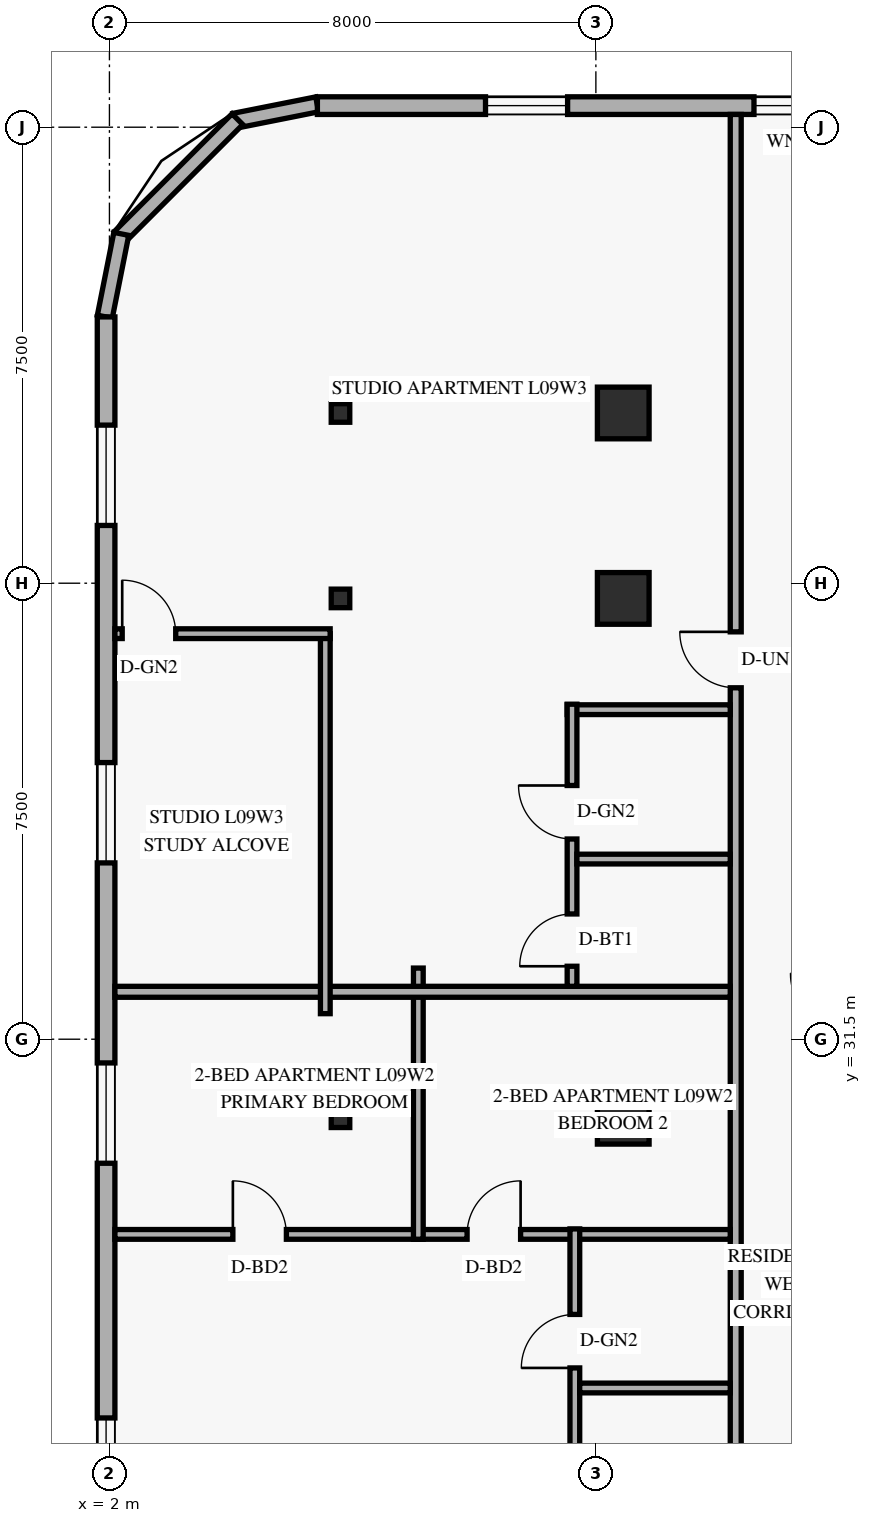
"""IFC4 building model, lengths in metres.
Left out: names, types, materials, properties, quantities, classifications, styles, units other than length and angle.
Written with IfcOpenShell. Run it as: python <this file> out.ifc"""

import sys

from ifc_helpers import new_model, si_unit, direction, frame, frame_2d, origin, origin_2d, place, context, subcontext, project, spatial, rectangle, hollow_rectangle, extrude, element, fill, save


model = new_model("IFC4")
c1 = context("Model", 3, precision=1e-05, world=origin(), true_north=direction((0.0, 1.0)))
c2 = subcontext(c1, "Body", "Model", "MODEL_VIEW")
j1 = project(units=[si_unit("LENGTHUNIT", "METRE"), si_unit("PLANEANGLEUNIT", "RADIAN")], contexts=[c1])
p1 = place(None, origin())
s1 = spatial("IfcSite", under=j1, at=p1, CompositionType="ELEMENT")
p2 = place(p1, origin())
s2 = spatial("IfcBuilding", under=s1, at=p2, CompositionType="ELEMENT")
p3 = place(p2, frame((0.0, 0.0, 38.4)))
s3 = spatial("IfcBuildingStorey", under=s2, at=p3, CompositionType="ELEMENT", Elevation=38.4)
for number, where, z_axis, x_axis in (
    (1, (5.8, 30.2, 0.0), (0.0, 0.0, 1.0), (1.0, 0.0, 0.0)),
    (2, (5.8, 38.75, 0.0), (0.0, 0.0, 1.0), (1.0, 0.0, 0.0)),
    (3, (5.8, 41.8, 0.0), (0.0, 0.0, 1.0), (1.0, 0.0, 0.0)),
):
    element("IfcColumn", number, at=place(p3, frame(where, z_axis=z_axis, x_axis=x_axis)), inside=s3, PredefinedType="COLUMN", context=c2, shape_type="SweptSolid", body=[
        extrude(hollow_rectangle(XDim=0.305, YDim=0.305, WallThickness=0.013, at=origin_2d()), origin(), (0.0, 0.0, 1.0), 3.6),
    ])
for number, where, z_axis, x_axis in (
    (4, (10.45, 30.2, 0.0), (0.0, 0.0, 1.0), (1.0, 0.0, 0.0)),
    (5, (10.45, 38.75, 0.0), (0.0, 0.0, 1.0), (1.0, 0.0, 0.0)),
    (6, (10.45, 41.8, 0.0), (0.0, 0.0, 1.0), (1.0, 0.0, 0.0)),
):
    element("IfcColumn", number, at=place(p3, frame(where, z_axis=z_axis, x_axis=x_axis)), inside=s3, PredefinedType="COLUMN", context=c2, shape_type="SweptSolid", body=[
        extrude(rectangle(XDim=0.85, YDim=0.85, at=origin_2d()), origin(), (0.0, 0.0, 1.0), 3.6),
    ])
p4 = place(p3, frame((5.417, 46.876, 0.0), z_axis=(0.0, 0.0, 1.0), x_axis=(-0.980809899341, -0.19496651342, 0.0)))
e7 = element("IfcWall", 7, at=p4, inside=s3, PredefinedType="SOLIDWALL", context=c2, shape_type="SweptSolid", body=[
    extrude(rectangle(XDim=1.389, YDim=0.25, at=frame_2d((0.694, 0.0))), origin(), (0.0, 0.0, 1.0), 3.36),
])
p5 = place(p3, frame((4.105, 46.632, 0.0), z_axis=(0.0, 0.0, 1.0), x_axis=(-0.707106781187, -0.707106781187, 0.0)))
e8 = element("IfcWall", 8, at=p5, inside=s3, PredefinedType="SOLIDWALL", context=c2, shape_type="SweptSolid", body=[
    extrude(rectangle(XDim=2.739, YDim=0.25, at=frame_2d((1.37, 0.0))), origin(), (0.0, 0.0, 1.0), 3.36),
])
p6 = place(p3, frame((2.195, 44.746, 0.0), z_axis=(0.0, 0.0, 1.0), x_axis=(-0.19496651342, -0.980809899341, 0.0)))
e9 = element("IfcWall", 9, at=p6, inside=s3, PredefinedType="SOLIDWALL", context=c2, shape_type="SweptSolid", body=[
    extrude(rectangle(XDim=1.389, YDim=0.25, at=frame_2d((0.694, 0.0))), origin(), (0.0, 0.0, 1.0), 3.36),
])
p7 = place(p3, frame((44.98, 46.855, 0.0), z_axis=(0.0, 0.0, 1.0), x_axis=(-1.0, 0.0, 0.0)))
e10 = element("IfcWall", 10, at=p7, inside=s3, PredefinedType="SOLIDWALL", context=c2, shape_type="SweptSolid", body=[
    extrude(rectangle(XDim=39.56, YDim=0.29, at=frame_2d((19.78, 0.0))), origin(), (0.0, 0.0, 1.0), 3.36),
])
p8 = place(p7, frame((35.445, 0.0, 0.85)))
e11 = element("IfcOpeningElement", 11, at=p8, cuts=e10, PredefinedType="OPENING", context=c2, shape_type="SweptSolid", body=[
    extrude(rectangle(XDim=1.35, YDim=1.55, at=frame_2d((0.675, 0.775))), frame((0.0, 0.155, 0.0), z_axis=(0.0, -1.0, 0.0), x_axis=(1.0, 0.0, 0.0)), (0.0, 0.0, 1.0), 0.31),
])
p9 = place(p7, frame((31.18, 0.0, 0.85)))
e12 = element("IfcOpeningElement", 12, at=p9, cuts=e10, PredefinedType="OPENING", context=c2, shape_type="SweptSolid", body=[
    extrude(rectangle(XDim=1.2, YDim=1.5, at=frame_2d((0.6, 0.75))), frame((0.0, 0.155, 0.0), z_axis=(0.0, -1.0, 0.0), x_axis=(1.0, 0.0, 0.0)), (0.0, 0.0, 1.0), 0.31),
])
p10 = place(p7, frame((25.834, 0.0, 0.85)))
e13 = element("IfcOpeningElement", 13, at=p10, cuts=e10, PredefinedType="OPENING", context=c2, shape_type="SweptSolid", body=[
    extrude(rectangle(XDim=1.35, YDim=1.55, at=frame_2d((0.675, 0.775))), frame((0.0, 0.155, 0.0), z_axis=(0.0, -1.0, 0.0), x_axis=(1.0, 0.0, 0.0)), (0.0, 0.0, 1.0), 0.31),
])
p11 = place(p7, frame((18.799, 0.0, 0.85)))
e14 = element("IfcOpeningElement", 14, at=p11, cuts=e10, PredefinedType="OPENING", context=c2, shape_type="SweptSolid", body=[
    extrude(rectangle(XDim=1.35, YDim=1.55, at=frame_2d((0.675, 0.775))), frame((0.0, 0.155, 0.0), z_axis=(0.0, -1.0, 0.0), x_axis=(1.0, 0.0, 0.0)), (0.0, 0.0, 1.0), 0.31),
])
p12 = place(p7, frame((12.51, 0.0, 0.85)))
e15 = element("IfcOpeningElement", 15, at=p12, cuts=e10, PredefinedType="OPENING", context=c2, shape_type="SweptSolid", body=[
    extrude(rectangle(XDim=1.35, YDim=1.55, at=frame_2d((0.675, 0.775))), frame((0.0, 0.155, 0.0), z_axis=(0.0, -1.0, 0.0), x_axis=(1.0, 0.0, 0.0)), (0.0, 0.0, 1.0), 0.31),
])
p13 = place(p7, frame((7.82, 0.0, 0.85)))
e16 = element("IfcOpeningElement", 16, at=p13, cuts=e10, PredefinedType="OPENING", context=c2, shape_type="SweptSolid", body=[
    extrude(rectangle(XDim=1.35, YDim=1.55, at=frame_2d((0.675, 0.775))), frame((0.0, 0.155, 0.0), z_axis=(0.0, -1.0, 0.0), x_axis=(1.0, 0.0, 0.0)), (0.0, 0.0, 1.0), 0.31),
])
p14 = place(p7, frame((5.333, 0.0, 0.85)))
e17 = element("IfcOpeningElement", 17, at=p14, cuts=e10, PredefinedType="OPENING", context=c2, shape_type="SweptSolid", body=[
    extrude(rectangle(XDim=1.35, YDim=1.55, at=frame_2d((0.675, 0.775))), frame((0.0, 0.155, 0.0), z_axis=(0.0, -1.0, 0.0), x_axis=(1.0, 0.0, 0.0)), (0.0, 0.0, 1.0), 0.31),
])
p15 = place(p7, frame((1.618, 0.0, 0.85)))
e18 = element("IfcOpeningElement", 18, at=p15, cuts=e10, PredefinedType="OPENING", context=c2, shape_type="SweptSolid", body=[
    extrude(rectangle(XDim=1.35, YDim=1.55, at=frame_2d((0.675, 0.775))), frame((0.0, 0.155, 0.0), z_axis=(0.0, -1.0, 0.0), x_axis=(1.0, 0.0, 0.0)), (0.0, 0.0, 1.0), 0.31),
])
p16 = place(p3, frame((1.945, 43.38, 0.0), z_axis=(0.0, 0.0, 1.0), x_axis=(0.0, -1.0, 0.0)))
e19 = element("IfcWall", 19, at=p16, inside=s3, PredefinedType="SOLIDWALL", context=c2, shape_type="SweptSolid", body=[
    extrude(rectangle(XDim=38.76, YDim=0.29, at=frame_2d((19.38, 0.0))), origin(), (0.0, 0.0, 1.0), 3.36),
])
p17 = place(p16, frame((33.975, 0.0, 0.85)))
e20 = element("IfcOpeningElement", 20, at=p17, cuts=e19, PredefinedType="OPENING", context=c2, shape_type="SweptSolid", body=[
    extrude(rectangle(XDim=1.65, YDim=1.6, at=frame_2d((0.825, 0.8))), frame((0.0, 0.155, 0.0), z_axis=(0.0, -1.0, 0.0), x_axis=(1.0, 0.0, 0.0)), (0.0, 0.0, 1.0), 0.31),
])
p18 = place(p16, frame((27.965, 0.0, 0.85)))
e21 = element("IfcOpeningElement", 21, at=p18, cuts=e19, PredefinedType="OPENING", context=c2, shape_type="SweptSolid", body=[
    extrude(rectangle(XDim=1.65, YDim=1.6, at=frame_2d((0.825, 0.8))), frame((0.0, 0.155, 0.0), z_axis=(0.0, -1.0, 0.0), x_axis=(1.0, 0.0, 0.0)), (0.0, 0.0, 1.0), 0.31),
])
p19 = place(p16, frame((23.934, 0.0, 0.85)))
e22 = element("IfcOpeningElement", 22, at=p19, cuts=e19, PredefinedType="OPENING", context=c2, shape_type="SweptSolid", body=[
    extrude(rectangle(XDim=1.65, YDim=1.6, at=frame_2d((0.825, 0.8))), frame((0.0, 0.155, 0.0), z_axis=(0.0, -1.0, 0.0), x_axis=(1.0, 0.0, 0.0)), (0.0, 0.0, 1.0), 0.31),
])
p20 = place(p16, frame((18.109, 0.0, 0.85)))
e23 = element("IfcOpeningElement", 23, at=p20, cuts=e19, PredefinedType="OPENING", context=c2, shape_type="SweptSolid", body=[
    extrude(rectangle(XDim=1.65, YDim=1.6, at=frame_2d((0.825, 0.8))), frame((0.0, 0.155, 0.0), z_axis=(0.0, -1.0, 0.0), x_axis=(1.0, 0.0, 0.0)), (0.0, 0.0, 1.0), 0.31),
])
p21 = place(p16, frame((12.27, 0.0, 0.85)))
e24 = element("IfcOpeningElement", 24, at=p21, cuts=e19, PredefinedType="OPENING", context=c2, shape_type="SweptSolid", body=[
    extrude(rectangle(XDim=1.65, YDim=1.6, at=frame_2d((0.825, 0.8))), frame((0.0, 0.155, 0.0), z_axis=(0.0, -1.0, 0.0), x_axis=(1.0, 0.0, 0.0)), (0.0, 0.0, 1.0), 0.31),
])
p22 = place(p16, frame((7.33, 0.0, 0.85)))
e25 = element("IfcOpeningElement", 25, at=p22, cuts=e19, PredefinedType="OPENING", context=c2, shape_type="SweptSolid", body=[
    extrude(rectangle(XDim=1.65, YDim=1.6, at=frame_2d((0.825, 0.8))), frame((0.0, 0.155, 0.0), z_axis=(0.0, -1.0, 0.0), x_axis=(1.0, 0.0, 0.0)), (0.0, 0.0, 1.0), 0.31),
])
p23 = place(p16, frame((1.78, 0.0, 0.85)))
e26 = element("IfcOpeningElement", 26, at=p23, cuts=e19, PredefinedType="OPENING", context=c2, shape_type="SweptSolid", body=[
    extrude(rectangle(XDim=1.65, YDim=1.6, at=frame_2d((0.825, 0.8))), frame((0.0, 0.155, 0.0), z_axis=(0.0, -1.0, 0.0), x_axis=(1.0, 0.0, 0.0)), (0.0, 0.0, 1.0), 0.31),
])
p24 = place(p3, frame((12.3, 1.29, 0.0), z_axis=(0.0, 0.0, 1.0), x_axis=(0.0, 1.0, 0.0)))
e27 = element("IfcWall", 27, at=p24, inside=s3, PredefinedType="STANDARD", context=c2, shape_type="SweptSolid", body=[
    extrude(rectangle(XDim=45.42, YDim=0.18, at=frame_2d((22.71, 0.0))), origin(), (0.0, 0.0, 1.0), 2.649),
])
p25 = place(p24, frame((8.06, 0.0, 0.0)))
e28 = element("IfcOpeningElement", 28, at=p25, cuts=e27, PredefinedType="OPENING", context=c2, shape_type="SweptSolid", body=[
    extrude(rectangle(XDim=0.92, YDim=2.15, at=frame_2d((0.46, 1.075))), frame((0.0, 0.1, 0.0), z_axis=(0.0, -1.0, 0.0), x_axis=(1.0, 0.0, 0.0)), (0.0, 0.0, 1.0), 0.2),
])
p26 = place(p24, frame((21.021, 0.0, 0.0)))
e29 = element("IfcOpeningElement", 29, at=p26, cuts=e27, PredefinedType="OPENING", context=c2, shape_type="SweptSolid", body=[
    extrude(rectangle(XDim=0.92, YDim=2.15, at=frame_2d((0.46, 1.075))), frame((0.0, 0.1, 0.0), z_axis=(0.0, -1.0, 0.0), x_axis=(1.0, 0.0, 0.0)), (0.0, 0.0, 1.0), 0.2),
])
p27 = place(p24, frame((35.99, 0.0, 0.0)))
e30 = element("IfcOpeningElement", 30, at=p27, cuts=e27, PredefinedType="OPENING", context=c2, shape_type="SweptSolid", body=[
    extrude(rectangle(XDim=0.92, YDim=2.15, at=frame_2d((0.46, 1.075))), frame((0.0, 0.1, 0.0), z_axis=(0.0, -1.0, 0.0), x_axis=(1.0, 0.0, 0.0)), (0.0, 0.0, 1.0), 0.2),
])
p28 = place(p3, frame((2.09, 28.29, 0.0), z_axis=(0.0, 0.0, 1.0), x_axis=(1.0, 0.0, 0.0)))
e31 = element("IfcWall", 31, at=p28, inside=s3, PredefinedType="PARTITIONING", context=c2, shape_type="SweptSolid", body=[
    extrude(rectangle(XDim=10.12, YDim=0.16, at=frame_2d((5.06, 0.0))), origin(), (0.0, 0.0, 1.0), 2.649),
])
p29 = place(p28, frame((1.94, 0.0, 0.0)))
e32 = element("IfcOpeningElement", 32, at=p29, cuts=e31, PredefinedType="OPENING", context=c2, shape_type="SweptSolid", body=[
    extrude(rectangle(XDim=0.88, YDim=2.14, at=frame_2d((0.44, 1.07))), frame((0.0, 0.09, 0.0), z_axis=(0.0, -1.0, 0.0), x_axis=(1.0, 0.0, 0.0)), (0.0, 0.0, 1.0), 0.18),
])
p30 = place(p28, frame((5.792, 0.0, 0.0)))
e33 = element("IfcOpeningElement", 33, at=p30, cuts=e31, PredefinedType="OPENING", context=c2, shape_type="SweptSolid", body=[
    extrude(rectangle(XDim=0.88, YDim=2.14, at=frame_2d((0.44, 1.07))), frame((0.0, 0.09, 0.0), z_axis=(0.0, -1.0, 0.0), x_axis=(1.0, 0.0, 0.0)), (0.0, 0.0, 1.0), 0.18),
])
p31 = place(p3, frame((9.654, 23.521, 0.0), z_axis=(0.0, 0.0, 1.0), x_axis=(0.0, 1.0, 0.0)))
e34 = element("IfcWall", 34, at=p31, inside=s3, PredefinedType="PLUMBINGWALL", context=c2, shape_type="SweptSolid", body=[
    extrude(rectangle(XDim=4.858, YDim=0.16, at=frame_2d((2.429, 0.0))), origin(), (0.0, 0.0, 1.0), 3.36),
])
p32 = place(p31, frame((0.42, 0.0, 0.0)))
e35 = element("IfcOpeningElement", 35, at=p32, cuts=e34, PredefinedType="OPENING", context=c2, shape_type="SweptSolid", body=[
    extrude(rectangle(XDim=0.86, YDim=2.12, at=frame_2d((0.43, 1.06))), frame((0.0, 0.09, 0.0), z_axis=(0.0, -1.0, 0.0), x_axis=(1.0, 0.0, 0.0)), (0.0, 0.0, 1.0), 0.18),
])
p33 = place(p31, frame((2.572, 0.0, 0.0)))
e36 = element("IfcOpeningElement", 36, at=p33, cuts=e34, PredefinedType="OPENING", context=c2, shape_type="SweptSolid", body=[
    extrude(rectangle(XDim=0.88, YDim=2.12, at=frame_2d((0.44, 1.06))), frame((0.0, 0.09, 0.0), z_axis=(0.0, -1.0, 0.0), x_axis=(1.0, 0.0, 0.0)), (0.0, 0.0, 1.0), 0.18),
])
p34 = place(p3, frame((9.734, 25.764, 0.0), z_axis=(0.0, 0.0, 1.0), x_axis=(1.0, 0.0, 0.0)))
e37 = element("IfcWall", 37, at=p34, inside=s3, PredefinedType="PLUMBINGWALL", context=c2, shape_type="SweptSolid", body=[
    extrude(rectangle(XDim=2.476, YDim=0.16, at=frame_2d((1.238, 0.0))), origin(), (0.0, 0.0, 1.0), 2.649),
])
p35 = place(p3, frame((7.08, 28.21, 0.0), z_axis=(0.0, 0.0, 1.0), x_axis=(0.0, 1.0, 0.0)))
e38 = element("IfcWall", 38, at=p35, inside=s3, PredefinedType="PARTITIONING", context=c2, shape_type="SweptSolid", body=[
    extrude(rectangle(XDim=4.46, YDim=0.16, at=frame_2d((2.23, 0.0))), origin(), (0.0, 0.0, 1.0), 2.649),
])
p36 = place(p3, frame((2.09, 32.28, 0.0), z_axis=(0.0, 0.0, 1.0), x_axis=(1.0, 0.0, 0.0)))
e39 = element("IfcWall", 39, at=p36, inside=s3, PredefinedType="PARTITIONING", context=c2, shape_type="SweptSolid", body=[
    extrude(rectangle(XDim=10.12, YDim=0.18, at=frame_2d((5.06, 0.0))), origin(), (0.0, 0.0, 1.0), 2.649),
])
p37 = place(p3, frame((9.528, 36.92, 0.0), z_axis=(0.0, 0.0, 1.0), x_axis=(1.0, 0.0, 0.0)))
e40 = element("IfcWall", 40, at=p37, inside=s3, PredefinedType="PLUMBINGWALL", context=c2, shape_type="SweptSolid", body=[
    extrude(rectangle(XDim=2.682, YDim=0.16, at=frame_2d((1.341, 0.0))), origin(), (0.0, 0.0, 1.0), 2.649),
])
p38 = place(p3, frame((9.608, 32.37, 0.0), z_axis=(0.0, 0.0, 1.0), x_axis=(0.0, 1.0, 0.0)))
e41 = element("IfcWall", 41, at=p38, inside=s3, PredefinedType="PLUMBINGWALL", context=c2, shape_type="SweptSolid", body=[
    extrude(rectangle(XDim=4.64, YDim=0.16, at=frame_2d((2.32, 0.0))), origin(), (0.0, 0.0, 1.0), 2.932),
])
p39 = place(p38, frame((0.33, 0.0, 0.0)))
e42 = element("IfcOpeningElement", 42, at=p39, cuts=e41, PredefinedType="OPENING", context=c2, shape_type="SweptSolid", body=[
    extrude(rectangle(XDim=0.86, YDim=2.12, at=frame_2d((0.43, 1.06))), frame((0.0, 0.09, 0.0), z_axis=(0.0, -1.0, 0.0), x_axis=(1.0, 0.0, 0.0)), (0.0, 0.0, 1.0), 0.18),
])
p40 = place(p38, frame((2.423, 0.0, 0.0)))
e43 = element("IfcOpeningElement", 43, at=p40, cuts=e41, PredefinedType="OPENING", context=c2, shape_type="SweptSolid", body=[
    extrude(rectangle(XDim=0.88, YDim=2.12, at=frame_2d((0.44, 1.06))), frame((0.0, 0.09, 0.0), z_axis=(0.0, -1.0, 0.0), x_axis=(1.0, 0.0, 0.0)), (0.0, 0.0, 1.0), 0.18),
])
p41 = place(p3, frame((9.688, 34.463, 0.0), z_axis=(0.0, 0.0, 1.0), x_axis=(1.0, 0.0, 0.0)))
e44 = element("IfcWall", 44, at=p41, inside=s3, PredefinedType="PLUMBINGWALL", context=c2, shape_type="SweptSolid", body=[
    extrude(rectangle(XDim=2.522, YDim=0.16, at=frame_2d((1.261, 0.0))), origin(), (0.0, 0.0, 1.0), 2.649),
])
p42 = place(p3, frame((5.55, 31.92, 0.0), z_axis=(0.0, 0.0, 1.0), x_axis=(0.0, 1.0, 0.0)))
e45 = element("IfcWall", 45, at=p42, inside=s3, PredefinedType="PARTITIONING", context=c2, shape_type="SweptSolid", body=[
    extrude(rectangle(XDim=6.25, YDim=0.16, at=frame_2d((3.125, 0.0))), origin(), (0.0, 0.0, 1.0), 3.36),
])
p43 = place(p3, frame((2.09, 38.17, 0.0), z_axis=(0.0, 0.0, 1.0), x_axis=(1.0, 0.0, 0.0)))
e46 = element("IfcWall", 46, at=p43, inside=s3, PredefinedType="PARTITIONING", context=c2, shape_type="SweptSolid", body=[
    extrude(rectangle(XDim=3.54, YDim=0.16, at=frame_2d((1.77, 0.0))), origin(), (0.0, 0.0, 1.0), 3.36),
])
p44 = place(p43, frame((0.12, 0.0, 0.0)))
e47 = element("IfcOpeningElement", 47, at=p44, cuts=e46, PredefinedType="OPENING", context=c2, shape_type="SweptSolid", body=[
    extrude(rectangle(XDim=0.88, YDim=2.12, at=frame_2d((0.44, 1.06))), frame((0.0, 0.09, 0.0), z_axis=(0.0, -1.0, 0.0), x_axis=(1.0, 0.0, 0.0)), (0.0, 0.0, 1.0), 0.18),
])
p45 = place(p8, origin())
e48 = element("IfcWindow", 48, at=p45, inside=s3, PartitioningType="SINGLE_PANEL", PredefinedType="WINDOW", context=c2, shape_type="SweptSolid", body=[
    extrude(rectangle(XDim=1.35, YDim=1.55, at=frame_2d((0.675, 0.775))), frame((0.0, 0.03, 0.0), z_axis=(0.0, -1.0, 0.0), x_axis=(1.0, 0.0, 0.0)), (0.0, 0.0, 1.0), 0.06),
])
fill(e11, e48)
p46 = place(p9, origin())
e49 = element("IfcWindow", 49, at=p46, inside=s3, PartitioningType="SINGLE_PANEL", PredefinedType="WINDOW", context=c2, shape_type="SweptSolid", body=[
    extrude(rectangle(XDim=1.2, YDim=1.5, at=frame_2d((0.6, 0.75))), frame((0.0, 0.03, 0.0), z_axis=(0.0, -1.0, 0.0), x_axis=(1.0, 0.0, 0.0)), (0.0, 0.0, 1.0), 0.06),
])
fill(e12, e49)
p47 = place(p20, origin())
e50 = element("IfcWindow", 50, at=p47, inside=s3, PartitioningType="SINGLE_PANEL", PredefinedType="WINDOW", context=c2, shape_type="SweptSolid", body=[
    extrude(rectangle(XDim=1.65, YDim=1.6, at=frame_2d((0.825, 0.8))), frame((0.0, 0.03, 0.0), z_axis=(0.0, -1.0, 0.0), x_axis=(1.0, 0.0, 0.0)), (0.0, 0.0, 1.0), 0.06),
])
fill(e23, e50)
p48 = place(p21, origin())
e51 = element("IfcWindow", 51, at=p48, inside=s3, PartitioningType="SINGLE_PANEL", PredefinedType="WINDOW", context=c2, shape_type="SweptSolid", body=[
    extrude(rectangle(XDim=1.65, YDim=1.6, at=frame_2d((0.825, 0.8))), frame((0.0, 0.03, 0.0), z_axis=(0.0, -1.0, 0.0), x_axis=(1.0, 0.0, 0.0)), (0.0, 0.0, 1.0), 0.06),
])
fill(e24, e51)
p49 = place(p22, origin())
e52 = element("IfcWindow", 52, at=p49, inside=s3, PartitioningType="SINGLE_PANEL", PredefinedType="WINDOW", context=c2, shape_type="SweptSolid", body=[
    extrude(rectangle(XDim=1.65, YDim=1.6, at=frame_2d((0.825, 0.8))), frame((0.0, 0.03, 0.0), z_axis=(0.0, -1.0, 0.0), x_axis=(1.0, 0.0, 0.0)), (0.0, 0.0, 1.0), 0.06),
])
fill(e25, e52)
p50 = place(p23, origin())
e53 = element("IfcWindow", 53, at=p50, inside=s3, PartitioningType="SINGLE_PANEL", PredefinedType="WINDOW", context=c2, shape_type="SweptSolid", body=[
    extrude(rectangle(XDim=1.65, YDim=1.6, at=frame_2d((0.825, 0.8))), frame((0.0, 0.03, 0.0), z_axis=(0.0, -1.0, 0.0), x_axis=(1.0, 0.0, 0.0)), (0.0, 0.0, 1.0), 0.06),
])
fill(e26, e53)
p51 = place(p33, origin())
e54 = element("IfcDoor", 54, at=p51, inside=s3, OperationType="SINGLE_SWING_LEFT", PredefinedType="DOOR", context=c2, shape_type="SweptSolid", body=[
    extrude(rectangle(XDim=0.88, YDim=2.12, at=frame_2d((0.44, 1.06))), frame((0.0, 0.025, 0.0), z_axis=(0.0, -1.0, 0.0), x_axis=(1.0, 0.0, 0.0)), (0.0, 0.0, 1.0), 0.05),
])
fill(e36, e54)
p52 = place(p29, origin())
e55 = element("IfcDoor", 55, at=p52, inside=s3, OperationType="SINGLE_SWING_LEFT", PredefinedType="DOOR", context=c2, shape_type="SweptSolid", body=[
    extrude(rectangle(XDim=0.88, YDim=2.14, at=frame_2d((0.44, 1.07))), frame((0.0, 0.025, 0.0), z_axis=(0.0, -1.0, 0.0), x_axis=(1.0, 0.0, 0.0)), (0.0, 0.0, 1.0), 0.05),
])
fill(e32, e55)
p53 = place(p30, origin())
e56 = element("IfcDoor", 56, at=p53, inside=s3, OperationType="SINGLE_SWING_RIGHT", PredefinedType="DOOR", context=c2, shape_type="SweptSolid", body=[
    extrude(rectangle(XDim=0.88, YDim=2.14, at=frame_2d((0.44, 1.07))), frame((0.0, 0.025, 0.0), z_axis=(0.0, -1.0, 0.0), x_axis=(1.0, 0.0, 0.0)), (0.0, 0.0, 1.0), 0.05),
])
fill(e33, e56)
p54 = place(p44, origin())
e57 = element("IfcDoor", 57, at=p54, inside=s3, OperationType="SINGLE_SWING_LEFT", PredefinedType="DOOR", context=c2, shape_type="SweptSolid", body=[
    extrude(rectangle(XDim=0.88, YDim=2.12, at=frame_2d((0.44, 1.06))), frame((0.0, 0.025, 0.0), z_axis=(0.0, -1.0, 0.0), x_axis=(1.0, 0.0, 0.0)), (0.0, 0.0, 1.0), 0.05),
])
fill(e47, e57)
p55 = place(p27, origin())
e58 = element("IfcDoor", 58, at=p55, inside=s3, OperationType="SINGLE_SWING_RIGHT", PredefinedType="DOOR", context=c2, shape_type="SweptSolid", body=[
    extrude(rectangle(XDim=0.92, YDim=2.15, at=frame_2d((0.46, 1.075))), frame((0.0, 0.025, 0.0), z_axis=(0.0, -1.0, 0.0), x_axis=(1.0, 0.0, 0.0)), (0.0, 0.0, 1.0), 0.05),
])
fill(e30, e58)
p56 = place(p39, origin())
e59 = element("IfcDoor", 59, at=p56, inside=s3, OperationType="SINGLE_SWING_LEFT", PredefinedType="DOOR", context=c2, shape_type="SweptSolid", body=[
    extrude(rectangle(XDim=0.86, YDim=2.12, at=frame_2d((0.43, 1.06))), frame((0.0, 0.025, 0.0), z_axis=(0.0, -1.0, 0.0), x_axis=(1.0, 0.0, 0.0)), (0.0, 0.0, 1.0), 0.05),
])
fill(e42, e59)
p57 = place(p40, origin())
e60 = element("IfcDoor", 60, at=p57, inside=s3, OperationType="SINGLE_SWING_RIGHT", PredefinedType="DOOR", context=c2, shape_type="SweptSolid", body=[
    extrude(rectangle(XDim=0.88, YDim=2.12, at=frame_2d((0.44, 1.06))), frame((0.0, 0.025, 0.0), z_axis=(0.0, -1.0, 0.0), x_axis=(1.0, 0.0, 0.0)), (0.0, 0.0, 1.0), 0.05),
])
fill(e43, e60)
save(model, sys.argv[1])
